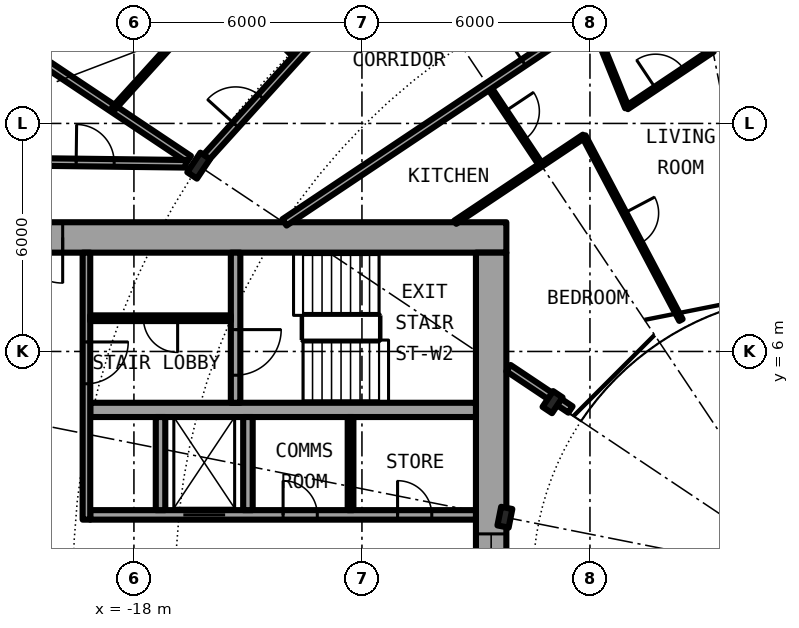
"""IFC4 building model, lengths in metres.
Left out: names, types, materials, properties, quantities, classifications, styles, units other than length and angle.
Written with IfcOpenShell. Run it as: python <this file> out.ifc"""

import sys

from ifc_helpers import new_model, si_unit, direction, frame, frame_2d, origin, origin_2d, place, context, subcontext, project, spatial, rectangle, i_section, extrude, element, fill, save


model = new_model("IFC4")
c1 = context("Model", 3, precision=1e-05, world=origin(), true_north=direction((0.0, 1.0)))
c2 = subcontext(c1, "Body", "Model", "MODEL_VIEW")
j1 = project(units=[si_unit("LENGTHUNIT", "METRE"), si_unit("PLANEANGLEUNIT", "RADIAN")], contexts=[c1])
p1 = place(None, origin())
s1 = spatial("IfcSite", under=j1, at=p1, CompositionType="ELEMENT")
p2 = place(p1, origin())
s2 = spatial("IfcBuilding", under=s1, at=p2, CompositionType="ELEMENT")
p3 = place(p2, frame((0.0, 0.0, 28.9)))
s3 = spatial("IfcBuildingStorey", under=s2, at=p3, CompositionType="ELEMENT", Elevation=28.9)
p4 = place(p3, frame((-16.297, 10.889, 0.0), z_axis=(0.0, 0.0, 1.0), x_axis=(-0.831469612303, 0.55557023302, 0.0)))
e1 = element("IfcColumn", 1, at=p4, inside=s3, PredefinedType="COLUMN", context=c2, shape_type="SweptSolid", body=[
    extrude(i_section(OverallWidth=0.305, OverallDepth=0.62, WebThickness=0.021, FlangeThickness=0.04, FilletRadius=0.027, at=origin_2d()), origin(), (0.0, 0.0, 1.0), 3.05),
])
for number, where, z_axis, x_axis in (
    (2, (-6.984, 4.667, 0.0), (0.0, 0.0, 1.0), (-0.831, 0.556, 0.0)),
    (3, (-8.239, 1.639, 0.0), (0.0, 0.0, 1.0), (-0.981, 0.195, 0.0)),
):
    element("IfcColumn", number, at=place(p3, frame(where, z_axis=z_axis, x_axis=x_axis)), inside=s3, PredefinedType="COLUMN", context=c2, shape_type="SweptSolid", body=[
        extrude(i_section(OverallWidth=0.3, OverallDepth=0.5, WebThickness=0.014, FlangeThickness=0.028, FilletRadius=0.027, at=origin_2d()), origin(), (0.0, 0.0, 1.0), 3.05),
    ])
p5 = place(p3, frame((-8.2, 9.0, 0.0), z_axis=(0.0, 0.0, 1.0), x_axis=(-1.0, 0.0, 0.0)))
e4 = element("IfcWall", 4, at=p5, inside=s3, PredefinedType="SHEAR", context=c2, shape_type="SweptSolid", body=[
    extrude(rectangle(XDim=14.2, YDim=0.8, at=frame_2d((7.1, 0.0))), origin(), (0.0, 0.0, 1.0), 3.05),
])
p6 = place(p5, frame((11.675, 0.0, 0.0)))
e5 = element("IfcOpeningElement", 5, at=p6, cuts=e4, PredefinedType="OPENING", context=c2, shape_type="SweptSolid", body=[
    extrude(rectangle(XDim=1.2, YDim=2.3, at=frame_2d((0.6, 1.15))), frame((0.0, 0.41, 0.0), z_axis=(0.0, -1.0, 0.0), x_axis=(1.0, 0.0, 0.0)), (0.0, 0.0, 1.0), 0.82),
])
p7 = place(p3, frame((-8.6, 8.6, 0.0), z_axis=(0.0, 0.0, 1.0), x_axis=(0.0, -1.0, 0.0)))
e6 = element("IfcWall", 6, at=p7, inside=s3, PredefinedType="SHEAR", context=c2, shape_type="SweptSolid", body=[
    extrude(rectangle(XDim=17.2, YDim=0.8, at=frame_2d((8.6, 0.0))), origin(), (0.0, 0.0, 1.0), 3.05),
])
p8 = place(p7, frame((7.4, 0.0, 0.1)))
e7 = element("IfcOpeningElement", 7, at=p8, cuts=e6, PredefinedType="OPENING", context=c2, shape_type="SweptSolid", body=[
    extrude(rectangle(XDim=2.4, YDim=2.2, at=frame_2d((1.2, 1.1))), frame((0.0, 0.41, 0.0), z_axis=(0.0, -1.0, 0.0), x_axis=(1.0, 0.0, 0.0)), (0.0, 0.0, 1.0), 0.82),
])
p9 = place(p3, frame((-19.15, 1.7, 0.0), z_axis=(0.0, 0.0, 1.0), x_axis=(1.0, 0.0, 0.0)))
e8 = element("IfcWall", 8, at=p9, inside=s3, PredefinedType="SHEAR", context=c2, shape_type="SweptSolid", body=[
    extrude(rectangle(XDim=10.15, YDim=0.25, at=frame_2d((5.075, 0.0))), origin(), (0.0, 0.0, 1.0), 3.05),
])
p10 = place(p9, frame((2.45, 0.0, 0.0)))
e9 = element("IfcOpeningElement", 9, at=p10, cuts=e8, PredefinedType="OPENING", context=c2, shape_type="SweptSolid", body=[
    extrude(rectangle(XDim=1.1, YDim=2.3, at=frame_2d((0.55, 1.15))), frame((0.0, 0.135, 0.0), z_axis=(0.0, -1.0, 0.0), x_axis=(1.0, 0.0, 0.0)), (0.0, 0.0, 1.0), 0.27),
])
p11 = place(p9, frame((8.087, 0.0, 0.0)))
e10 = element("IfcOpeningElement", 10, at=p11, cuts=e8, PredefinedType="OPENING", context=c2, shape_type="SweptSolid", body=[
    extrude(rectangle(XDim=0.9, YDim=2.3, at=frame_2d((0.45, 1.15))), frame((0.0, 0.135, 0.0), z_axis=(0.0, -1.0, 0.0), x_axis=(1.0, 0.0, 0.0)), (0.0, 0.0, 1.0), 0.27),
])
p12 = place(p9, frame((5.075, 0.0, 0.0)))
e11 = element("IfcOpeningElement", 11, at=p12, cuts=e8, PredefinedType="OPENING", context=c2, shape_type="SweptSolid", body=[
    extrude(rectangle(XDim=0.9, YDim=2.3, at=frame_2d((0.45, 1.15))), frame((0.0, 0.135, 0.0), z_axis=(0.0, -1.0, 0.0), x_axis=(1.0, 0.0, 0.0)), (0.0, 0.0, 1.0), 0.27),
])
p13 = place(p3, frame((-9.0, 4.462, 0.0), z_axis=(0.0, 0.0, 1.0), x_axis=(-1.0, 0.0, 0.0)))
e12 = element("IfcWall", 12, at=p13, inside=s3, PredefinedType="SHEAR", context=c2, shape_type="SweptSolid", body=[
    extrude(rectangle(XDim=10.15, YDim=0.375, at=frame_2d((5.075, 0.0))), origin(), (0.0, 0.0, 1.0), 3.05),
])
p14 = place(p3, frame((-15.325, 8.6, 0.0), z_axis=(0.0, 0.0, 1.0), x_axis=(0.0, -1.0, 0.0)))
e13 = element("IfcWall", 13, at=p14, inside=s3, PredefinedType="SHEAR", context=c2, shape_type="SweptSolid", body=[
    extrude(rectangle(XDim=3.95, YDim=0.25, at=frame_2d((1.975, 0.0))), origin(), (0.0, 0.0, 1.0), 3.05),
])
p15 = place(p14, frame((2.025, 0.0, 0.0)))
e14 = element("IfcOpeningElement", 14, at=p15, cuts=e13, PredefinedType="OPENING", context=c2, shape_type="SweptSolid", body=[
    extrude(rectangle(XDim=1.2, YDim=2.3, at=frame_2d((0.6, 1.15))), frame((0.0, 0.135, 0.0), z_axis=(0.0, -1.0, 0.0), x_axis=(1.0, 0.0, 0.0)), (0.0, 0.0, 1.0), 0.27),
])
for number, where, z_axis, x_axis in (
    (15, (-15.0, 1.825, 0.0), (0.0, 0.0, 1.0), (0.0, 1.0, 0.0)),
    (16, (-17.3, 1.825, 0.0), (0.0, 0.0, 1.0), (0.0, 1.0, 0.0)),
):
    element("IfcWall", number, at=place(p3, frame(where, z_axis=z_axis, x_axis=x_axis)), inside=s3, PredefinedType="SOLIDWALL", context=c2, shape_type="SweptSolid", body=[
        extrude(rectangle(XDim=2.45, YDim=0.25, at=frame_2d((1.225, 0.0))), origin(), (0.0, 0.0, 1.0), 2.7),
    ])
p16 = place(p3, frame((-19.25, 8.6, 0.0), z_axis=(0.0, 0.0, 1.0), x_axis=(0.0, -1.0, 0.0)))
e17 = element("IfcWall", 17, at=p16, inside=s3, PredefinedType="SOLIDWALL", context=c2, shape_type="SweptSolid", body=[
    extrude(rectangle(XDim=7.025, YDim=0.2, at=frame_2d((3.513, 0.0))), origin(), (0.0, 0.0, 1.0), 2.7),
])
p17 = place(p16, frame((2.35, 0.0, 0.0)))
e18 = element("IfcOpeningElement", 18, at=p17, cuts=e17, PredefinedType="OPENING", context=c2, shape_type="SweptSolid", body=[
    extrude(rectangle(XDim=1.1, YDim=2.3, at=frame_2d((0.55, 1.15))), frame((0.0, 0.11, 0.0), z_axis=(0.0, -1.0, 0.0), x_axis=(1.0, 0.0, 0.0)), (0.0, 0.0, 1.0), 0.22),
])
p18 = place(p3, frame((-12.3, 1.825, 0.0), z_axis=(0.0, 0.0, 1.0), x_axis=(0.0, 1.0, 0.0)))
e19 = element("IfcWall", 19, at=p18, inside=s3, PredefinedType="PARTITIONING", context=c2, shape_type="SweptSolid", body=[
    extrude(rectangle(XDim=2.45, YDim=0.15, at=frame_2d((1.225, 0.0))), origin(), (0.0, 0.0, 1.0), 2.7),
])
p19 = place(p3, frame((-15.45, 6.875, 0.0), z_axis=(0.0, 0.0, 1.0), x_axis=(-1.0, 0.0, 0.0)))
e20 = element("IfcWall", 20, at=p19, inside=s3, PredefinedType="PARTITIONING", context=c2, shape_type="SweptSolid", body=[
    extrude(rectangle(XDim=3.7, YDim=0.15, at=frame_2d((1.85, 0.0))), origin(), (0.0, 0.0, 1.0), 2.7),
])
p20 = place(p19, frame((1.4, 0.0, 0.0)))
e21 = element("IfcOpeningElement", 21, at=p20, cuts=e20, PredefinedType="OPENING", context=c2, shape_type="SweptSolid", body=[
    extrude(rectangle(XDim=0.9, YDim=2.3, at=frame_2d((0.45, 1.15))), frame((0.0, 0.085, 0.0), z_axis=(0.0, -1.0, 0.0), x_axis=(1.0, 0.0, 0.0)), (0.0, 0.0, 1.0), 0.17),
])
p21 = place(p3, frame((-22.595, 15.097, 0.0), z_axis=(0.0, 0.0, 1.0), x_axis=(0.831465568067, -0.555576285599, 0.0)))
e22 = element("IfcWall", 22, at=p21, inside=s3, PredefinedType="PARTITIONING", context=c2, shape_type="SweptSolid", body=[
    extrude(rectangle(XDim=7.264, YDim=0.2, at=frame_2d((3.632, 0.0))), origin(), (0.0, 0.0, 1.0), 2.7),
])
p22 = place(p3, frame((-15.612, 15.622, 0.0), z_axis=(0.0, 0.0, 1.0), x_axis=(0.706741540154, -0.707471833659, 0.0)))
e23 = element("IfcWall", 23, at=p22, inside=s3, PredefinedType="PARTITIONING", context=c2, shape_type="SweptSolid", body=[
    extrude(rectangle(XDim=2.674, YDim=0.1, at=frame_2d((1.337, 0.0))), origin(), (0.0, 0.0, 1.0), 2.7),
])
p23 = place(p22, frame((0.887, 0.0, 0.0)))
e24 = element("IfcOpeningElement", 24, at=p23, cuts=e23, PredefinedType="OPENING", context=c2, shape_type="SweptSolid", body=[
    extrude(rectangle(XDim=0.9, YDim=2.3, at=frame_2d((0.45, 1.15))), frame((0.0, 0.06, 0.0), z_axis=(0.0, -1.0, 0.0), x_axis=(1.0, 0.0, 0.0)), (0.0, 0.0, 1.0), 0.12),
])
p24 = place(p3, frame((-8.674, 12.982, 0.0), z_axis=(0.0, 0.0, 1.0), x_axis=(0.555355163998, -0.831613276602, 0.0)))
e25 = element("IfcWall", 25, at=p24, inside=s3, PredefinedType="PARTITIONING", context=c2, shape_type="SweptSolid", body=[
    extrude(rectangle(XDim=2.494, YDim=0.1, at=frame_2d((1.247, 0.0))), origin(), (0.0, 0.0, 1.0), 2.7),
])
p25 = place(p24, frame((0.797, 0.0, 0.0)))
e26 = element("IfcOpeningElement", 26, at=p25, cuts=e25, PredefinedType="OPENING", context=c2, shape_type="SweptSolid", body=[
    extrude(rectangle(XDim=0.9, YDim=2.3, at=frame_2d((0.45, 1.15))), frame((0.0, 0.06, 0.0), z_axis=(0.0, -1.0, 0.0), x_axis=(1.0, 0.0, 0.0)), (0.0, 0.0, 1.0), 0.12),
])
p26 = place(p3, frame((-6.16, 11.663, 0.0), z_axis=(0.0, 0.0, 1.0), x_axis=(0.466976820365, -0.884269556889, 0.0)))
e27 = element("IfcWall", 27, at=p26, inside=s3, PredefinedType="PARTITIONING", context=c2, shape_type="SweptSolid", body=[
    extrude(rectangle(XDim=5.469, YDim=0.1, at=frame_2d((2.735, 0.0))), origin(), (0.0, 0.0, 1.0), 2.7),
])
p27 = place(p26, frame((2.285, 0.0, 0.0)))
e28 = element("IfcOpeningElement", 28, at=p27, cuts=e27, PredefinedType="OPENING", context=c2, shape_type="SweptSolid", body=[
    extrude(rectangle(XDim=0.9, YDim=2.3, at=frame_2d((0.45, 1.15))), frame((0.0, 0.06, 0.0), z_axis=(0.0, -1.0, 0.0), x_axis=(1.0, 0.0, 0.0)), (0.0, 0.0, 1.0), 0.12),
])
p28 = place(p3, frame((-5.986, 14.779, 0.0), z_axis=(0.0, 0.0, 1.0), x_axis=(0.375649498413, -0.926761811008, 0.0)))
e29 = element("IfcWall", 29, at=p28, inside=s3, PredefinedType="PARTITIONING", context=c2, shape_type="SweptSolid", body=[
    extrude(rectangle(XDim=2.548, YDim=0.1, at=frame_2d((1.274, 0.0))), origin(), (0.0, 0.0, 1.0), 2.7),
])
p29 = place(p3, frame((-6.513, 4.472, 0.0), z_axis=(0.0, 0.0, 1.0), x_axis=(-0.831417956244, 0.555647533996, 0.0)))
e30 = element("IfcWall", 30, at=p29, inside=s3, PredefinedType="PARTITIONING", context=c2, shape_type="SweptSolid", body=[
    extrude(rectangle(XDim=1.962, YDim=0.2, at=frame_2d((0.981, 0.0))), origin(), (0.0, 0.0, 1.0), 2.7),
])
p30 = place(p3, frame((-21.675, 11.0, 0.0), z_axis=(0.0, 0.0, 1.0), x_axis=(0.99992425795, -0.012307654658, 0.0)))
e31 = element("IfcWall", 31, at=p30, inside=s3, PredefinedType="PARTITIONING", context=c2, shape_type="SweptSolid", body=[
    extrude(rectangle(XDim=5.039, YDim=0.2, at=frame_2d((2.519, 0.0))), origin(), (0.0, 0.0, 1.0), 2.7),
])
p31 = place(p30, frame((2.155, 0.0, 0.0)))
e32 = element("IfcOpeningElement", 32, at=p31, cuts=e31, PredefinedType="OPENING", context=c2, shape_type="SweptSolid", body=[
    extrude(rectangle(XDim=1.0, YDim=2.3, at=frame_2d((0.5, 1.15))), frame((0.0, 0.11, 0.0), z_axis=(0.0, -1.0, 0.0), x_axis=(1.0, 0.0, 0.0)), (0.0, 0.0, 1.0), 0.22),
])
p32 = place(p3, frame((-9.546, 9.4, 0.0), z_axis=(0.0, 0.0, 1.0), x_axis=(0.831459707426, 0.555585056429, 0.0)))
e33 = element("IfcWall", 33, at=p32, inside=s3, PredefinedType="PARTITIONING", context=c2, shape_type="SweptSolid", body=[
    extrude(rectangle(XDim=4.073, YDim=0.1, at=frame_2d((2.037, 0.0))), origin(), (0.0, 0.0, 1.0), 2.7),
])
p33 = place(p3, frame((-5.03, 12.417, 0.0), z_axis=(0.0, 0.0, 1.0), x_axis=(0.831538390496, 0.555467285384, 0.0)))
e34 = element("IfcWall", 34, at=p33, inside=s3, PredefinedType="PARTITIONING", context=c2, shape_type="SweptSolid", body=[
    extrude(rectangle(XDim=2.717, YDim=0.1, at=frame_2d((1.358, 0.0))), origin(), (0.0, 0.0, 1.0), 2.7),
])
p34 = place(p33, frame((0.91, 0.0, 0.0)))
e35 = element("IfcOpeningElement", 35, at=p34, cuts=e34, PredefinedType="OPENING", context=c2, shape_type="SweptSolid", body=[
    extrude(rectangle(XDim=0.9, YDim=2.3, at=frame_2d((0.45, 1.15))), frame((0.0, 0.06, 0.0), z_axis=(0.0, -1.0, 0.0), x_axis=(1.0, 0.0, 0.0)), (0.0, 0.0, 1.0), 0.12),
])
p35 = place(p3, frame((-14.039, 9.396, 0.0), z_axis=(0.0, 0.0, 1.0), x_axis=(0.831348689697, 0.555751163866, 0.0)))
e36 = element("IfcWall", 36, at=p35, inside=s3, PredefinedType="PARTITIONING", context=c2, shape_type="SweptSolid", body=[
    extrude(rectangle(XDim=12.914, YDim=0.2, at=frame_2d((6.457, 0.0))), origin(), (0.0, 0.0, 1.0), 2.7),
])
p36 = place(p35, frame((7.568, 0.0, 0.0)))
e37 = element("IfcOpeningElement", 37, at=p36, cuts=e36, PredefinedType="OPENING", context=c2, shape_type="SweptSolid", body=[
    extrude(rectangle(XDim=1.0, YDim=2.3, at=frame_2d((0.5, 1.15))), frame((0.0, 0.11, 0.0), z_axis=(0.0, -1.0, 0.0), x_axis=(1.0, 0.0, 0.0)), (0.0, 0.0, 1.0), 0.22),
])
p37 = place(p3, frame((-16.193, 11.003, 0.0), z_axis=(0.0, 0.0, 1.0), x_axis=(0.671514934772, 0.740991020444, 0.0)))
e38 = element("IfcWall", 38, at=p37, inside=s3, PredefinedType="PARTITIONING", context=c2, shape_type="SweptSolid", body=[
    extrude(rectangle(XDim=5.598, YDim=0.2, at=frame_2d((2.799, 0.0))), origin(), (0.0, 0.0, 1.0), 2.38),
])
p38 = place(p37, frame((1.293, 0.0, 0.0)))
e39 = element("IfcOpeningElement", 39, at=p38, cuts=e38, PredefinedType="OPENING", context=c2, shape_type="SweptSolid", body=[
    extrude(rectangle(XDim=1.0, YDim=2.3, at=frame_2d((0.5, 1.15))), frame((0.0, 0.11, 0.0), z_axis=(0.0, -1.0, 0.0), x_axis=(1.0, 0.0, 0.0)), (0.0, 0.0, 1.0), 0.22),
])
p39 = place(p3, frame((-18.538, 12.394, 0.0), z_axis=(0.0, 0.0, 1.0), x_axis=(0.67169789574, 0.740825172937, 0.0)))
e40 = element("IfcWall", 40, at=p39, inside=s3, PredefinedType="PARTITIONING", context=c2, shape_type="SweptSolid", body=[
    extrude(rectangle(XDim=2.183, YDim=0.1, at=frame_2d((1.091, 0.0))), origin(), (0.0, 0.0, 1.0), 2.7),
])
p40 = place(p10, origin())
e41 = element("IfcDoor", 41, at=p40, inside=s3, OperationType="DOUBLE_DOOR_SLIDING", PredefinedType="DOOR", context=c2, shape_type="SweptSolid", body=[
    extrude(rectangle(XDim=1.1, YDim=2.3, at=frame_2d((0.55, 1.15))), frame((0.0, 0.025, 0.0), z_axis=(0.0, -1.0, 0.0), x_axis=(1.0, 0.0, 0.0)), (0.0, 0.0, 1.0), 0.05),
])
fill(e9, e41)
p41 = place(p11, origin())
e42 = element("IfcDoor", 42, at=p41, inside=s3, OperationType="SINGLE_SWING_LEFT", PredefinedType="DOOR", context=c2, shape_type="SweptSolid", body=[
    extrude(rectangle(XDim=0.9, YDim=2.3, at=frame_2d((0.45, 1.15))), frame((0.0, 0.025, 0.0), z_axis=(0.0, -1.0, 0.0), x_axis=(1.0, 0.0, 0.0)), (0.0, 0.0, 1.0), 0.05),
])
fill(e10, e42)
p42 = place(p12, origin())
e43 = element("IfcDoor", 43, at=p42, inside=s3, OperationType="SINGLE_SWING_LEFT", PredefinedType="DOOR", context=c2, shape_type="SweptSolid", body=[
    extrude(rectangle(XDim=0.9, YDim=2.3, at=frame_2d((0.45, 1.15))), frame((0.0, 0.025, 0.0), z_axis=(0.0, -1.0, 0.0), x_axis=(1.0, 0.0, 0.0)), (0.0, 0.0, 1.0), 0.05),
])
fill(e11, e43)
p43 = place(p20, origin())
e44 = element("IfcDoor", 44, at=p43, inside=s3, OperationType="SINGLE_SWING_LEFT", PredefinedType="DOOR", context=c2, shape_type="SweptSolid", body=[
    extrude(rectangle(XDim=0.9, YDim=2.3, at=frame_2d((0.45, 1.15))), frame((0.0, 0.025, 0.0), z_axis=(0.0, -1.0, 0.0), x_axis=(1.0, 0.0, 0.0)), (0.0, 0.0, 1.0), 0.05),
])
fill(e21, e44)
p44 = place(p15, origin())
e45 = element("IfcDoor", 45, at=p44, inside=s3, OperationType="SINGLE_SWING_LEFT", PredefinedType="DOOR", context=c2, shape_type="SweptSolid", body=[
    extrude(rectangle(XDim=1.2, YDim=2.3, at=frame_2d((0.6, 1.15))), frame((0.0, 0.025, 0.0), z_axis=(0.0, -1.0, 0.0), x_axis=(1.0, 0.0, 0.0)), (0.0, 0.0, 1.0), 0.05),
])
fill(e14, e45)
p45 = place(p17, origin())
e46 = element("IfcDoor", 46, at=p45, inside=s3, OperationType="SINGLE_SWING_RIGHT", PredefinedType="DOOR", context=c2, shape_type="SweptSolid", body=[
    extrude(rectangle(XDim=1.1, YDim=2.3, at=frame_2d((0.55, 1.15))), frame((0.0, 0.025, 0.0), z_axis=(0.0, -1.0, 0.0), x_axis=(1.0, 0.0, 0.0)), (0.0, 0.0, 1.0), 0.05),
])
fill(e18, e46)
p46 = place(p6, origin())
e47 = element("IfcDoor", 47, at=p46, inside=s3, OperationType="SINGLE_SWING_LEFT", PredefinedType="DOOR", context=c2, shape_type="SweptSolid", body=[
    extrude(rectangle(XDim=1.2, YDim=2.3, at=frame_2d((0.6, 1.15))), frame((0.0, 0.025, 0.0), z_axis=(0.0, -1.0, 0.0), x_axis=(1.0, 0.0, 0.0)), (0.0, 0.0, 1.0), 0.05),
])
fill(e5, e47)
p47 = place(p8, origin())
e48 = element("IfcWindow", 48, at=p47, inside=s3, PartitioningType="SINGLE_PANEL", PredefinedType="WINDOW", context=c2, shape_type="SweptSolid", body=[
    extrude(rectangle(XDim=2.4, YDim=2.2, at=frame_2d((1.2, 1.1))), frame((0.0, 0.03, 0.0), z_axis=(0.0, -1.0, 0.0), x_axis=(1.0, 0.0, 0.0)), (0.0, 0.0, 1.0), 0.06),
])
fill(e7, e48)
p48 = place(p38, origin())
e49 = element("IfcDoor", 49, at=p48, inside=s3, OperationType="SINGLE_SWING_LEFT", PredefinedType="DOOR", context=c2, shape_type="SweptSolid", body=[
    extrude(rectangle(XDim=1.0, YDim=2.3, at=frame_2d((0.5, 1.15))), frame((0.0, 0.025, 0.0), z_axis=(0.0, -1.0, 0.0), x_axis=(1.0, 0.0, 0.0)), (0.0, 0.0, 1.0), 0.05),
])
fill(e39, e49)
p49 = place(p36, origin())
e50 = element("IfcDoor", 50, at=p49, inside=s3, OperationType="SINGLE_SWING_RIGHT", PredefinedType="DOOR", context=c2, shape_type="SweptSolid", body=[
    extrude(rectangle(XDim=1.0, YDim=2.3, at=frame_2d((0.5, 1.15))), frame((0.0, 0.025, 0.0), z_axis=(0.0, -1.0, 0.0), x_axis=(1.0, 0.0, 0.0)), (0.0, 0.0, 1.0), 0.05),
])
fill(e37, e50)
p50 = place(p34, origin())
e51 = element("IfcDoor", 51, at=p50, inside=s3, OperationType="SINGLE_SWING_RIGHT", PredefinedType="DOOR", context=c2, shape_type="SweptSolid", body=[
    extrude(rectangle(XDim=0.9, YDim=2.3, at=frame_2d((0.45, 1.15))), frame((0.0, 0.025, 0.0), z_axis=(0.0, -1.0, 0.0), x_axis=(1.0, 0.0, 0.0)), (0.0, 0.0, 1.0), 0.05),
])
fill(e35, e51)
p51 = place(p25, origin())
e52 = element("IfcDoor", 52, at=p51, inside=s3, OperationType="SINGLE_SWING_RIGHT", PredefinedType="DOOR", context=c2, shape_type="SweptSolid", body=[
    extrude(rectangle(XDim=0.9, YDim=2.3, at=frame_2d((0.45, 1.15))), frame((0.0, 0.025, 0.0), z_axis=(0.0, -1.0, 0.0), x_axis=(1.0, 0.0, 0.0)), (0.0, 0.0, 1.0), 0.05),
])
fill(e26, e52)
p52 = place(p27, origin())
e53 = element("IfcDoor", 53, at=p52, inside=s3, OperationType="SINGLE_SWING_RIGHT", PredefinedType="DOOR", context=c2, shape_type="SweptSolid", body=[
    extrude(rectangle(XDim=0.9, YDim=2.3, at=frame_2d((0.45, 1.15))), frame((0.0, 0.025, 0.0), z_axis=(0.0, -1.0, 0.0), x_axis=(1.0, 0.0, 0.0)), (0.0, 0.0, 1.0), 0.05),
])
fill(e28, e53)
p53 = place(p31, origin())
e54 = element("IfcDoor", 54, at=p53, inside=s3, OperationType="SINGLE_SWING_RIGHT", PredefinedType="DOOR", context=c2, shape_type="SweptSolid", body=[
    extrude(rectangle(XDim=1.0, YDim=2.3, at=frame_2d((0.5, 1.15))), frame((0.0, 0.025, 0.0), z_axis=(0.0, -1.0, 0.0), x_axis=(1.0, 0.0, 0.0)), (0.0, 0.0, 1.0), 0.05),
])
fill(e32, e54)
save(model, sys.argv[1])
